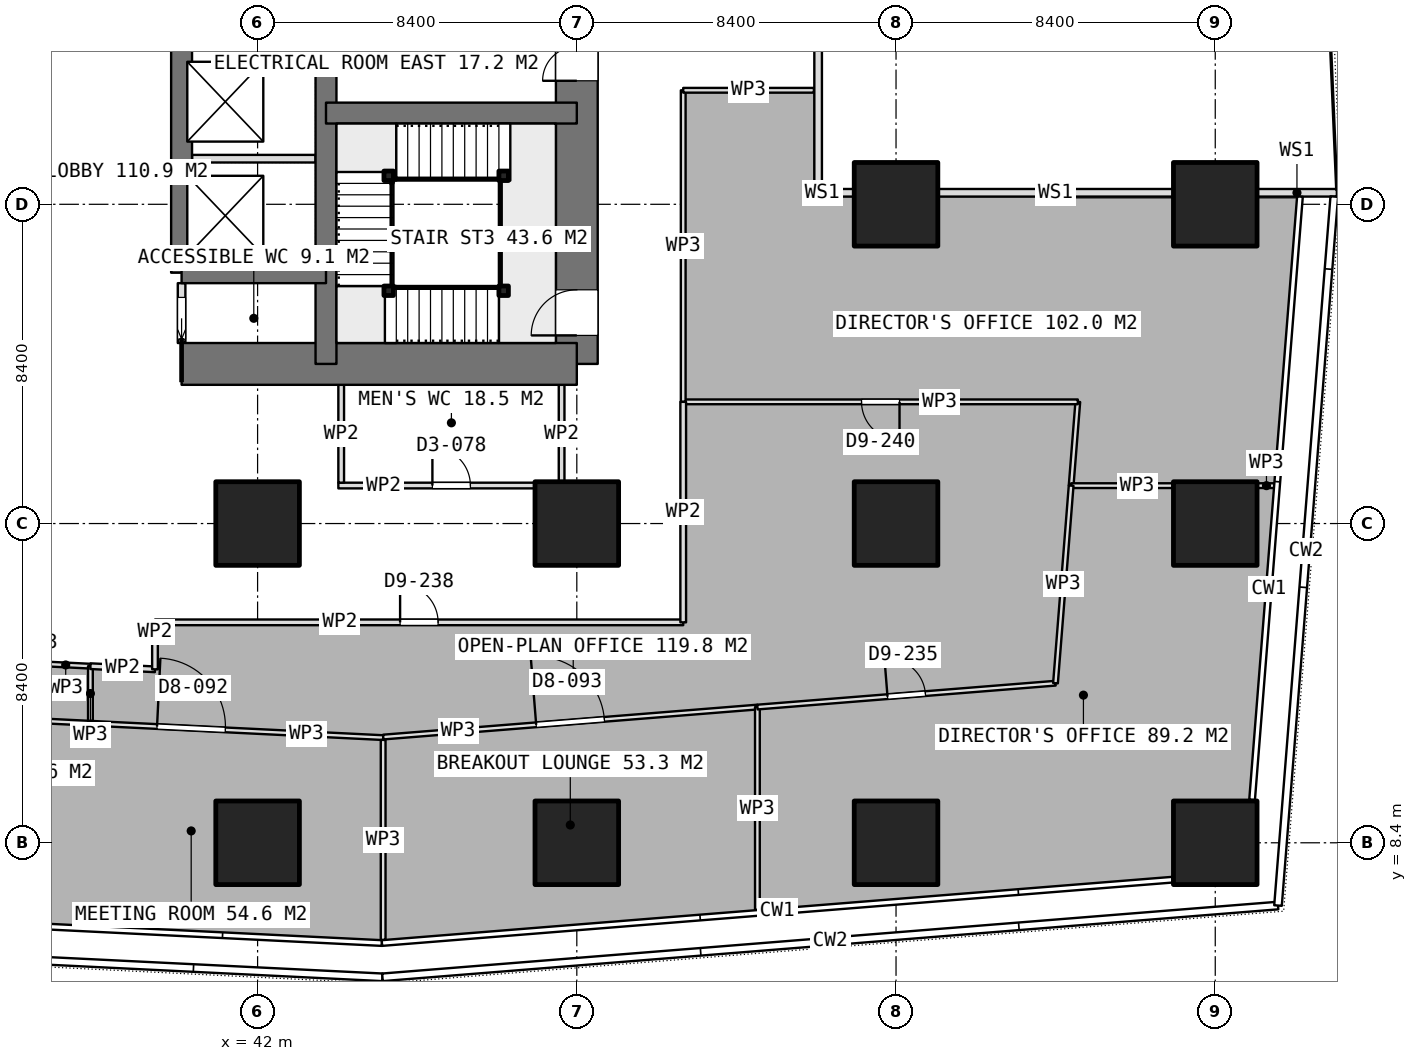
"""IFC4 building model, lengths in metres.
Left out: names, types, materials, properties, quantities, classifications, styles, units other than length and angle.
Written with IfcOpenShell. Run it as: python <this file> out.ifc"""

import sys

from ifc_helpers import new_model, si_unit, direction, frame, frame_2d, origin, origin_2d, place, context, subcontext, project, spatial, rectangle, extrude, element, fill, save


model = new_model("IFC4")
c1 = context("Model", 3, precision=1e-05, world=origin(), true_north=direction((0.0, 1.0)))
c2 = subcontext(c1, "Body", "Model", "MODEL_VIEW")
j1 = project(units=[si_unit("LENGTHUNIT", "METRE"), si_unit("PLANEANGLEUNIT", "RADIAN")], contexts=[c1])
p1 = place(None, origin())
s1 = spatial("IfcSite", under=j1, at=p1, CompositionType="ELEMENT")
p2 = place(p1, origin())
s2 = spatial("IfcBuilding", under=s1, at=p2, CompositionType="ELEMENT")
p3 = place(p2, frame((0.0, 0.0, 70.4)))
s3 = spatial("IfcBuildingStorey", under=s2, at=p3, CompositionType="ELEMENT", Elevation=70.4)
p4 = place(p3, frame((40.0, 21.0, 0.0), z_axis=(0.0, 0.0, 1.0), x_axis=(1.0, 0.0, 0.0)))
e1 = element("IfcWall", 1, at=p4, inside=s3, PredefinedType="SHEAR", context=c2, shape_type="SweptSolid", body=[
    extrude(rectangle(XDim=10.4, YDim=1.1, at=frame_2d((5.2, 0.0))), origin(), (0.0, 0.0, 1.0), 3.75),
])
p5 = place(p3, frame((50.4, 21.0, 0.0), z_axis=(0.0, 0.0, 1.0), x_axis=(0.0, 1.0, 0.0)))
e2 = element("IfcWall", 2, at=p5, inside=s3, PredefinedType="SHEAR", context=c2, shape_type="SweptSolid", body=[
    extrude(rectangle(XDim=25.2, YDim=1.1, at=frame_2d((12.6, 0.0))), origin(), (0.0, 0.0, 1.0), 3.75),
])
p6 = place(p5, frame((16.2, 0.0, 0.0)))
e3 = element("IfcOpeningElement", 3, at=p6, cuts=e2, PredefinedType="OPENING", context=c2, shape_type="SweptSolid", body=[
    extrude(rectangle(XDim=1.2, YDim=2.1, at=frame_2d((0.6, 1.05))), frame((0.0, 0.56, 0.0), z_axis=(0.0, -1.0, 0.0), x_axis=(1.0, 0.0, 0.0)), (0.0, 0.0, 1.0), 1.12),
])
p7 = place(p5, frame((10.05, 0.0, 0.0)))
e4 = element("IfcOpeningElement", 4, at=p7, cuts=e2, PredefinedType="OPENING", context=c2, shape_type="SweptSolid", body=[
    extrude(rectangle(XDim=0.9, YDim=2.1, at=frame_2d((0.45, 1.05))), frame((0.0, 0.56, 0.0), z_axis=(0.0, -1.0, 0.0), x_axis=(1.0, 0.0, 0.0)), (0.0, 0.0, 1.0), 1.12),
])
p8 = place(p5, frame((7.45, 0.0, 0.0)))
e5 = element("IfcOpeningElement", 5, at=p8, cuts=e2, PredefinedType="OPENING", context=c2, shape_type="SweptSolid", body=[
    extrude(rectangle(XDim=0.9, YDim=2.1, at=frame_2d((0.45, 1.05))), frame((0.0, 0.56, 0.0), z_axis=(0.0, -1.0, 0.0), x_axis=(1.0, 0.0, 0.0)), (0.0, 0.0, 1.0), 1.12),
])
p9 = place(p5, frame((0.75, 0.0, 0.0)))
e6 = element("IfcOpeningElement", 6, at=p9, cuts=e2, PredefinedType="OPENING", context=c2, shape_type="SweptSolid", body=[
    extrude(rectangle(XDim=1.2, YDim=2.1, at=frame_2d((0.6, 1.05))), frame((0.0, 0.56, 0.0), z_axis=(0.0, -1.0, 0.0), x_axis=(1.0, 0.0, 0.0)), (0.0, 0.0, 1.0), 1.12),
])
p10 = place(p3, frame((43.8, 21.0, 0.0), z_axis=(0.0, 0.0, 1.0), x_axis=(0.0, 1.0, 0.0)))
e7 = element("IfcWall", 7, at=p10, inside=s3, PredefinedType="SHEAR", context=c2, shape_type="SweptSolid", body=[
    extrude(rectangle(XDim=25.2, YDim=0.55, at=frame_2d((12.6, 0.0))), origin(), (0.0, 0.0, 1.0), 3.75),
])
p11 = place(p3, frame((40.0, 23.4, 0.0), z_axis=(0.0, 0.0, 1.0), x_axis=(0.0, 1.0, 0.0)))
e8 = element("IfcWall", 8, at=p11, inside=s3, PredefinedType="SHEAR", context=c2, shape_type="SweptSolid", body=[
    extrude(rectangle(XDim=18.0, YDim=0.55, at=frame_2d((9.0, 0.0))), origin(), (0.0, 0.0, 1.0), 3.75),
])
p12 = place(p3, frame((40.0, 23.4, 0.0), z_axis=(0.0, 0.0, 1.0), x_axis=(1.0, 0.0, 0.0)))
e9 = element("IfcWall", 9, at=p12, inside=s3, PredefinedType="SHEAR", context=c2, shape_type="SweptSolid", body=[
    extrude(rectangle(XDim=3.8, YDim=0.55, at=frame_2d((1.9, 0.0))), origin(), (0.0, 0.0, 1.0), 3.75),
])
p13 = place(p3, frame((43.8, 27.6, 0.0), z_axis=(0.0, 0.0, 1.0), x_axis=(1.0, 0.0, 0.0)))
e10 = element("IfcWall", 10, at=p13, inside=s3, PredefinedType="SHEAR", context=c2, shape_type="SweptSolid", body=[
    extrude(rectangle(XDim=6.6, YDim=0.55, at=frame_2d((3.3, 0.0))), origin(), (0.0, 0.0, 1.0), 3.75),
])
for number, where, z_axis, x_axis in (
    (11, (42.0, 8.4, 0.0), (0.0, 0.0, 1.0), (1.0, 0.0, 0.0)),
    (12, (42.0, 16.8, 0.0), (0.0, 0.0, 1.0), (1.0, 0.0, 0.0)),
    (13, (50.4, 8.4, 0.0), (0.0, 0.0, 1.0), (1.0, 0.0, 0.0)),
    (14, (50.4, 16.8, 0.0), (0.0, 0.0, 1.0), (1.0, 0.0, 0.0)),
    (15, (58.8, 8.4, 0.0), (0.0, 0.0, 1.0), (1.0, 0.0, 0.0)),
    (16, (58.8, 16.8, 0.0), (0.0, 0.0, 1.0), (1.0, 0.0, 0.0)),
    (17, (58.8, 25.2, 0.0), (0.0, 0.0, 1.0), (1.0, 0.0, 0.0)),
    (18, (67.2, 8.4, 0.0), (0.0, 0.0, 1.0), (1.0, 0.0, 0.0)),
    (19, (67.2, 16.8, 0.0), (0.0, 0.0, 1.0), (1.0, 0.0, 0.0)),
    (20, (67.2, 25.2, 0.0), (0.0, 0.0, 1.0), (1.0, 0.0, 0.0)),
):
    element("IfcColumn", number, at=place(p3, frame(where, z_axis=z_axis, x_axis=x_axis)), inside=s3, PredefinedType="COLUMN", context=c2, shape_type="SweptSolid", body=[
        extrude(rectangle(XDim=2.2, YDim=2.2, at=origin_2d()), origin(), (0.0, 0.0, 1.0), 3.75),
    ])
p14 = place(p3, frame((40.275, 26.4, 0.0), z_axis=(0.0, 0.0, 1.0), x_axis=(1.0, 0.0, 0.0)))
e21 = element("IfcWall", 21, at=p14, inside=s3, PredefinedType="PARTITIONING", context=c2, shape_type="SweptSolid", body=[
    extrude(rectangle(XDim=3.25, YDim=0.2, at=frame_2d((1.625, 0.0))), origin(), (0.0, 0.0, 1.0), 3.5),
])
p15 = place(p3, frame((40.0, 21.55, 0.0), z_axis=(0.0, 0.0, 1.0), x_axis=(0.0, 1.0, 0.0)))
e22 = element("IfcWall", 22, at=p15, inside=s3, PredefinedType="PARTITIONING", context=c2, shape_type="SweptSolid", body=[
    extrude(rectangle(XDim=1.575, YDim=0.2, at=frame_2d((0.788, 0.0))), origin(), (0.0, 0.0, 1.0), 3.5),
])
p16 = place(p15, frame((0.1, 0.0, 0.0)))
e23 = element("IfcOpeningElement", 23, at=p16, cuts=e22, PredefinedType="OPENING", context=c2, shape_type="SweptSolid", body=[
    extrude(rectangle(XDim=1.1, YDim=2.1, at=frame_2d((0.55, 1.05))), frame((0.0, 0.11, 0.0), z_axis=(0.0, -1.0, 0.0), x_axis=(1.0, 0.0, 0.0)), (0.0, 0.0, 1.0), 0.22),
])
p17 = place(p3, frame((44.125, 17.8, 0.0), z_axis=(0.0, 0.0, 1.0), x_axis=(1.0, 0.0, 0.0)))
e24 = element("IfcWall", 24, at=p17, inside=s3, PredefinedType="PARTITIONING", context=c2, shape_type="SweptSolid", body=[
    extrude(rectangle(XDim=5.95, YDim=0.15, at=frame_2d((2.975, 0.0))), origin(), (0.0, 0.0, 1.0), 3.5),
])
p18 = place(p17, frame((2.475, 0.0, 0.0)))
e25 = element("IfcOpeningElement", 25, at=p18, cuts=e24, PredefinedType="OPENING", context=c2, shape_type="SweptSolid", body=[
    extrude(rectangle(XDim=1.0, YDim=2.1, at=frame_2d((0.5, 1.05))), frame((0.0, 0.085, 0.0), z_axis=(0.0, -1.0, 0.0), x_axis=(1.0, 0.0, 0.0)), (0.0, 0.0, 1.0), 0.17),
])
for number, where, z_axis, x_axis in (
    (26, (44.2, 17.875, 0.0), (0.0, 0.0, 1.0), (0.0, 1.0, 0.0)),
    (27, (50.0, 17.875, 0.0), (0.0, 0.0, 1.0), (0.0, 1.0, 0.0)),
):
    element("IfcWall", number, at=place(p3, frame(where, z_axis=z_axis, x_axis=x_axis)), inside=s3, PredefinedType="PARTITIONING", context=c2, shape_type="SweptSolid", body=[
        extrude(rectangle(XDim=2.575, YDim=0.15, at=frame_2d((1.288, 0.0))), origin(), (0.0, 0.0, 1.0), 3.5),
    ])
p19 = place(p3, frame((35.201, 11.663, 0.0), z_axis=(0.0, 0.0, 1.0), x_axis=(0.998797064432, -0.049034927155, 0.0)))
e28 = element("IfcWall", 28, at=p19, inside=s3, PredefinedType="PARTITIONING", context=c2, shape_type="SweptSolid", body=[
    extrude(rectangle(XDim=10.117, YDim=0.125, at=frame_2d((5.059, 0.0))), origin(), (0.0, 0.0, 1.0), 3.5),
])
p20 = place(p19, frame((4.158, 0.0, 0.0)))
e29 = element("IfcOpeningElement", 29, at=p20, cuts=e28, PredefinedType="OPENING", context=c2, shape_type="SweptSolid", body=[
    extrude(rectangle(XDim=1.8, YDim=2.1, at=frame_2d((0.9, 1.05))), frame((0.0, 0.073, 0.0), z_axis=(0.0, -1.0, 0.0), x_axis=(1.0, 0.0, 0.0)), (0.0, 0.0, 1.0), 0.145),
])
p21 = place(p3, frame((45.304, 11.107, 0.0), z_axis=(0.0, 0.0, 1.0), x_axis=(0.0, -1.0, 0.0)))
e30 = element("IfcWall", 30, at=p21, inside=s3, PredefinedType="PARTITIONING", context=c2, shape_type="SweptSolid", body=[
    extrude(rectangle(XDim=5.262, YDim=0.125, at=frame_2d((2.631, 0.0))), origin(), (0.0, 0.0, 1.0), 3.5),
])
p22 = place(p3, frame((45.307, 11.182, 0.0), z_axis=(0.0, 0.0, 1.0), x_axis=(0.996803635633, 0.079890625164, 0.0)))
e31 = element("IfcWall", 31, at=p22, inside=s3, PredefinedType="PARTITIONING", context=c2, shape_type="SweptSolid", body=[
    extrude(rectangle(XDim=9.877, YDim=0.125, at=frame_2d((4.938, 0.0))), origin(), (0.0, 0.0, 1.0), 3.5),
])
p23 = place(p22, frame((4.037, 0.0, 0.0)))
e32 = element("IfcOpeningElement", 32, at=p23, cuts=e31, PredefinedType="OPENING", context=c2, shape_type="SweptSolid", body=[
    extrude(rectangle(XDim=1.8, YDim=2.1, at=frame_2d((0.9, 1.05))), frame((0.0, 0.073, 0.0), z_axis=(0.0, -1.0, 0.0), x_axis=(1.0, 0.0, 0.0)), (0.0, 0.0, 1.0), 0.145),
])
p24 = place(p3, frame((55.152, 11.971, 0.0), z_axis=(0.0, 0.0, 1.0), x_axis=(0.0, -1.0, 0.0)))
e33 = element("IfcWall", 33, at=p24, inside=s3, PredefinedType="PARTITIONING", context=c2, shape_type="SweptSolid", body=[
    extrude(rectangle(XDim=5.337, YDim=0.125, at=frame_2d((2.668, 0.0))), origin(), (0.0, 0.0, 1.0), 3.5),
])
p25 = place(p3, frame((63.408, 17.797, 0.0), z_axis=(0.0, 0.0, 1.0), x_axis=(1.0, 0.0, 0.0)))
e34 = element("IfcWall", 34, at=p25, inside=s3, PredefinedType="PARTITIONING", context=c2, shape_type="SweptSolid", body=[
    extrude(rectangle(XDim=2.672, YDim=0.125, at=frame_2d((1.336, 0.0))), origin(), (0.0, 0.0, 1.0), 3.5),
])
p26 = place(p3, frame((68.32, 17.797, 0.0), z_axis=(0.0, 0.0, 1.0), x_axis=(1.0, 0.0, 0.0)))
e35 = element("IfcWall", 35, at=p26, inside=s3, PredefinedType="PARTITIONING", context=c2, shape_type="SweptSolid", body=[
    extrude(rectangle(XDim=0.455, YDim=0.125, at=frame_2d((0.228, 0.0))), origin(), (0.0, 0.0, 1.0), 3.5),
])
p27 = place(p3, frame((55.153, 11.971, 0.0), z_axis=(0.0, 0.0, 1.0), x_axis=(0.996807874633, 0.079837717087, 0.0)))
e36 = element("IfcWall", 36, at=p27, inside=s3, PredefinedType="PARTITIONING", context=c2, shape_type="SweptSolid", body=[
    extrude(rectangle(XDim=7.868, YDim=0.125, at=frame_2d((3.934, 0.0))), origin(), (0.0, 0.0, 1.0), 3.5),
])
p28 = place(p27, frame((3.434, 0.0, 0.0)))
e37 = element("IfcOpeningElement", 37, at=p28, cuts=e36, PredefinedType="OPENING", context=c2, shape_type="SweptSolid", body=[
    extrude(rectangle(XDim=1.0, YDim=2.1, at=frame_2d((0.5, 1.05))), frame((0.0, 0.073, 0.0), z_axis=(0.0, -1.0, 0.0), x_axis=(1.0, 0.0, 0.0)), (0.0, 0.0, 1.0), 0.145),
])
p29 = place(p3, frame((62.996, 12.599, 0.0), z_axis=(0.0, 0.0, 1.0), x_axis=(0.078987793385, 0.996875583258, 0.0)))
e38 = element("IfcWall", 38, at=p29, inside=s3, PredefinedType="PARTITIONING", context=c2, shape_type="SweptSolid", body=[
    extrude(rectangle(XDim=5.214, YDim=0.125, at=frame_2d((2.607, 0.0))), origin(), (0.0, 0.0, 1.0), 3.5),
])
p30 = place(p3, frame((63.408, 17.798, 0.0), z_axis=(0.0, 0.0, 1.0), x_axis=(0.079179009267, 0.996860413745, 0.0)))
e39 = element("IfcWall", 39, at=p30, inside=s3, PredefinedType="PARTITIONING", context=c2, shape_type="SweptSolid", body=[
    extrude(rectangle(XDim=2.211, YDim=0.125, at=frame_2d((1.105, 0.0))), origin(), (0.0, 0.0, 1.0), 3.5),
])
p31 = place(p3, frame((63.583, 20.002, 0.0), z_axis=(0.0, 0.0, 1.0), x_axis=(-1.0, 0.0, 0.0)))
e40 = element("IfcWall", 40, at=p31, inside=s3, PredefinedType="PARTITIONING", context=c2, shape_type="SweptSolid", body=[
    extrude(rectangle(XDim=10.383, YDim=0.125, at=frame_2d((5.191, 0.0))), origin(), (0.0, 0.0, 1.0), 3.5),
])
p32 = place(p31, frame((4.691, 0.0, 0.0)))
e41 = element("IfcOpeningElement", 41, at=p32, cuts=e40, PredefinedType="OPENING", context=c2, shape_type="SweptSolid", body=[
    extrude(rectangle(XDim=1.0, YDim=2.1, at=frame_2d((0.5, 1.05))), frame((0.0, 0.073, 0.0), z_axis=(0.0, -1.0, 0.0), x_axis=(1.0, 0.0, 0.0)), (0.0, 0.0, 1.0), 0.145),
])
p33 = place(p3, frame((53.2, 20.002, 0.0), z_axis=(0.0, 0.0, 1.0), x_axis=(0.0, 1.0, 0.0)))
e42 = element("IfcWall", 42, at=p33, inside=s3, PredefinedType="PARTITIONING", context=c2, shape_type="SweptSolid", body=[
    extrude(rectangle(XDim=8.198, YDim=0.125, at=frame_2d((4.099, 0.0))), origin(), (0.0, 0.0, 1.0), 3.5),
])
p34 = place(p3, frame((53.2, 28.2, 0.0), z_axis=(0.0, 0.0, 1.0), x_axis=(1.0, 0.0, 0.0)))
e43 = element("IfcWall", 43, at=p34, inside=s3, PredefinedType="PARTITIONING", context=c2, shape_type="SweptSolid", body=[
    extrude(rectangle(XDim=3.439, YDim=0.125, at=frame_2d((1.719, 0.0))), origin(), (0.0, 0.0, 1.0), 3.5),
])
p35 = place(p3, frame((36.3, 13.111, 0.0), z_axis=(0.0, 0.0, 1.0), x_axis=(0.998793590669, -0.049105633469, 0.0)))
e44 = element("IfcWall", 44, at=p35, inside=s3, PredefinedType="PARTITIONING", context=c2, shape_type="SweptSolid", body=[
    extrude(rectangle(XDim=1.302, YDim=0.125, at=frame_2d((0.651, 0.0))), origin(), (0.0, 0.0, 1.0), 3.5),
])
p36 = place(p3, frame((37.601, 13.047, 0.0), z_axis=(0.0, 0.0, 1.0), x_axis=(0.0, -1.0, 0.0)))
e45 = element("IfcWall", 45, at=p36, inside=s3, PredefinedType="PARTITIONING", context=c2, shape_type="SweptSolid", body=[
    extrude(rectangle(XDim=1.439, YDim=0.125, at=frame_2d((0.72, 0.0))), origin(), (0.0, 0.0, 1.0), 3.5),
])
p37 = place(p3, frame((37.601, 13.047, 0.0), z_axis=(0.0, 0.0, 1.0), x_axis=(0.998808600268, -0.048799385557, 0.0)))
e46 = element("IfcWall", 46, at=p37, inside=s3, PredefinedType="PARTITIONING", context=c2, shape_type="SweptSolid", body=[
    extrude(rectangle(XDim=1.701, YDim=0.15, at=frame_2d((0.851, 0.0))), origin(), (0.0, 0.0, 1.0), 3.5),
])
p38 = place(p3, frame((39.3, 12.964, 0.0), z_axis=(0.0, 0.0, 1.0), x_axis=(0.0, 1.0, 0.0)))
e47 = element("IfcWall", 47, at=p38, inside=s3, PredefinedType="PARTITIONING", context=c2, shape_type="SweptSolid", body=[
    extrude(rectangle(XDim=1.236, YDim=0.15, at=frame_2d((0.618, 0.0))), origin(), (0.0, 0.0, 1.0), 3.5),
])
p39 = place(p3, frame((39.3, 14.2, 0.0), z_axis=(0.0, 0.0, 1.0), x_axis=(1.0, 0.0, 0.0)))
e48 = element("IfcWall", 48, at=p39, inside=s3, PredefinedType="PARTITIONING", context=c2, shape_type="SweptSolid", body=[
    extrude(rectangle(XDim=13.9, YDim=0.15, at=frame_2d((6.95, 0.0))), origin(), (0.0, 0.0, 1.0), 3.5),
])
p40 = place(p39, frame((6.45, 0.0, 0.0)))
e49 = element("IfcOpeningElement", 49, at=p40, cuts=e48, PredefinedType="OPENING", context=c2, shape_type="SweptSolid", body=[
    extrude(rectangle(XDim=1.0, YDim=2.1, at=frame_2d((0.5, 1.05))), frame((0.0, 0.085, 0.0), z_axis=(0.0, -1.0, 0.0), x_axis=(1.0, 0.0, 0.0)), (0.0, 0.0, 1.0), 0.17),
])
p41 = place(p3, frame((53.2, 14.2, 0.0), z_axis=(0.0, 0.0, 1.0), x_axis=(0.0, 1.0, 0.0)))
e50 = element("IfcWall", 50, at=p41, inside=s3, PredefinedType="PARTITIONING", context=c2, shape_type="SweptSolid", body=[
    extrude(rectangle(XDim=5.802, YDim=0.15, at=frame_2d((2.901, 0.0))), origin(), (0.0, 0.0, 1.0), 3.5),
])
for number, where, z_axis, x_axis in (
    (51, (48.475, 22.925, 0.0), (0.0, 0.0, 1.0), (1.0, 0.0, 0.0)),
    (52, (45.45, 22.925, 0.0), (0.0, 0.0, 1.0), (1.0, 0.0, 0.0)),
    (53, (45.45, 25.95, 0.0), (0.0, 0.0, 1.0), (1.0, 0.0, 0.0)),
    (54, (48.475, 25.95, 0.0), (0.0, 0.0, 1.0), (1.0, 0.0, 0.0)),
):
    element("IfcColumn", number, at=place(p3, frame(where, z_axis=z_axis, x_axis=x_axis)), inside=s3, PredefinedType="COLUMN", context=c2, shape_type="SweptSolid", body=[
        extrude(rectangle(XDim=0.25, YDim=0.25, at=origin_2d()), origin(), (0.0, 0.0, 1.0), 3.75),
    ])
p42 = place(p3, frame((56.75, 25.603, 0.0), z_axis=(0.0, 0.0, 1.0), x_axis=(0.0, 1.0, 0.0)))
e55 = element("IfcWall", 55, at=p42, inside=s3, PredefinedType="PARTITIONING", context=c2, shape_type="SweptSolid", body=[
    extrude(rectangle(XDim=26.007, YDim=0.2, at=frame_2d((13.003, 0.0))), origin(), (0.0, 0.0, 1.0), 3.5),
])
p43 = place(p42, frame((11.597, 0.0, 0.0)))
e56 = element("IfcOpeningElement", 56, at=p43, cuts=e55, PredefinedType="OPENING", context=c2, shape_type="SweptSolid", body=[
    extrude(rectangle(XDim=1.2, YDim=2.1, at=frame_2d((0.6, 1.05))), frame((0.0, 0.11, 0.0), z_axis=(0.0, -1.0, 0.0), x_axis=(1.0, 0.0, 0.0)), (0.0, 0.0, 1.0), 0.22),
])
p44 = place(p3, frame((56.65, 25.503, 0.0), z_axis=(0.0, 0.0, 1.0), x_axis=(1.0, 0.0, 0.0)))
e57 = element("IfcWall", 57, at=p44, inside=s3, PredefinedType="PARTITIONING", context=c2, shape_type="SweptSolid", body=[
    extrude(rectangle(XDim=1.05, YDim=0.2, at=frame_2d((0.525, 0.0))), origin(), (0.0, 0.0, 1.0), 3.5),
])
p45 = place(p3, frame((59.9, 25.503, 0.0), z_axis=(0.0, 0.0, 1.0), x_axis=(1.0, 0.0, 0.0)))
e58 = element("IfcWall", 58, at=p45, inside=s3, PredefinedType="PARTITIONING", context=c2, shape_type="SweptSolid", body=[
    extrude(rectangle(XDim=6.2, YDim=0.2, at=frame_2d((3.1, 0.0))), origin(), (0.0, 0.0, 1.0), 3.5),
])
p46 = place(p3, frame((68.3, 25.503, 0.0), z_axis=(0.0, 0.0, 1.0), x_axis=(1.0, 0.0, 0.0)))
e59 = element("IfcWall", 59, at=p46, inside=s3, PredefinedType="PARTITIONING", context=c2, shape_type="SweptSolid", body=[
    extrude(rectangle(XDim=2.1, YDim=0.2, at=frame_2d((1.05, 0.0))), origin(), (0.0, 0.0, 1.0), 3.5),
])
p47 = place(p8, origin())
e60 = element("IfcDoor", 60, at=p47, inside=s3, OperationType="SINGLE_SWING_LEFT", PredefinedType="DOOR", context=c2, shape_type="SweptSolid", body=[
    extrude(rectangle(XDim=0.9, YDim=2.1, at=frame_2d((0.45, 1.05))), frame((0.0, 0.025, 0.0), z_axis=(0.0, -1.0, 0.0), x_axis=(1.0, 0.0, 0.0)), (0.0, 0.0, 1.0), 0.05),
])
fill(e5, e60)
p48 = place(p16, origin())
e61 = element("IfcDoor", 61, at=p48, inside=s3, OperationType="SLIDING_TO_LEFT", PredefinedType="DOOR", context=c2, shape_type="SweptSolid", body=[
    extrude(rectangle(XDim=1.1, YDim=2.1, at=frame_2d((0.55, 1.05))), frame((0.0, 0.025, 0.0), z_axis=(0.0, -1.0, 0.0), x_axis=(1.0, 0.0, 0.0)), (0.0, 0.0, 1.0), 0.05),
])
fill(e23, e61)
p49 = place(p18, origin())
e62 = element("IfcDoor", 62, at=p49, inside=s3, OperationType="SINGLE_SWING_LEFT", PredefinedType="DOOR", context=c2, shape_type="SweptSolid", body=[
    extrude(rectangle(XDim=1.0, YDim=2.1, at=frame_2d((0.5, 1.05))), frame((0.0, 0.025, 0.0), z_axis=(0.0, -1.0, 0.0), x_axis=(1.0, 0.0, 0.0)), (0.0, 0.0, 1.0), 0.05),
])
fill(e25, e62)
p50 = place(p20, origin())
e63 = element("IfcDoor", 63, at=p50, inside=s3, OperationType="DOUBLE_DOOR_SINGLE_SWING", PredefinedType="DOOR", context=c2, shape_type="SweptSolid", body=[
    extrude(rectangle(XDim=1.8, YDim=2.1, at=frame_2d((0.9, 1.05))), frame((0.0, 0.025, 0.0), z_axis=(0.0, -1.0, 0.0), x_axis=(1.0, 0.0, 0.0)), (0.0, 0.0, 1.0), 0.05),
])
fill(e29, e63)
p51 = place(p23, origin())
e64 = element("IfcDoor", 64, at=p51, inside=s3, OperationType="DOUBLE_DOOR_SINGLE_SWING", PredefinedType="DOOR", context=c2, shape_type="SweptSolid", body=[
    extrude(rectangle(XDim=1.8, YDim=2.1, at=frame_2d((0.9, 1.05))), frame((0.0, 0.025, 0.0), z_axis=(0.0, -1.0, 0.0), x_axis=(1.0, 0.0, 0.0)), (0.0, 0.0, 1.0), 0.05),
])
fill(e32, e64)
p52 = place(p28, origin())
e65 = element("IfcDoor", 65, at=p52, inside=s3, OperationType="SINGLE_SWING_LEFT", PredefinedType="DOOR", context=c2, shape_type="SweptSolid", body=[
    extrude(rectangle(XDim=1.0, YDim=2.1, at=frame_2d((0.5, 1.05))), frame((0.0, 0.025, 0.0), z_axis=(0.0, -1.0, 0.0), x_axis=(1.0, 0.0, 0.0)), (0.0, 0.0, 1.0), 0.05),
])
fill(e37, e65)
p53 = place(p32, origin())
e66 = element("IfcDoor", 66, at=p53, inside=s3, OperationType="SINGLE_SWING_LEFT", PredefinedType="DOOR", context=c2, shape_type="SweptSolid", body=[
    extrude(rectangle(XDim=1.0, YDim=2.1, at=frame_2d((0.5, 1.05))), frame((0.0, 0.025, 0.0), z_axis=(0.0, -1.0, 0.0), x_axis=(1.0, 0.0, 0.0)), (0.0, 0.0, 1.0), 0.05),
])
fill(e41, e66)
p54 = place(p40, origin())
e67 = element("IfcDoor", 67, at=p54, inside=s3, OperationType="SINGLE_SWING_LEFT", PredefinedType="DOOR", context=c2, shape_type="SweptSolid", body=[
    extrude(rectangle(XDim=1.0, YDim=2.1, at=frame_2d((0.5, 1.05))), frame((0.0, 0.025, 0.0), z_axis=(0.0, -1.0, 0.0), x_axis=(1.0, 0.0, 0.0)), (0.0, 0.0, 1.0), 0.05),
])
fill(e49, e67)
p55 = place(p9, origin())
e68 = element("IfcDoor", 68, at=p55, inside=s3, OperationType="SINGLE_SWING_RIGHT", PredefinedType="DOOR", context=c2, shape_type="SweptSolid", body=[
    extrude(rectangle(XDim=1.2, YDim=2.1, at=frame_2d((0.6, 1.05))), frame((0.0, 0.025, 0.0), z_axis=(0.0, -1.0, 0.0), x_axis=(1.0, 0.0, 0.0)), (0.0, 0.0, 1.0), 0.05),
])
fill(e6, e68)
save(model, sys.argv[1])
